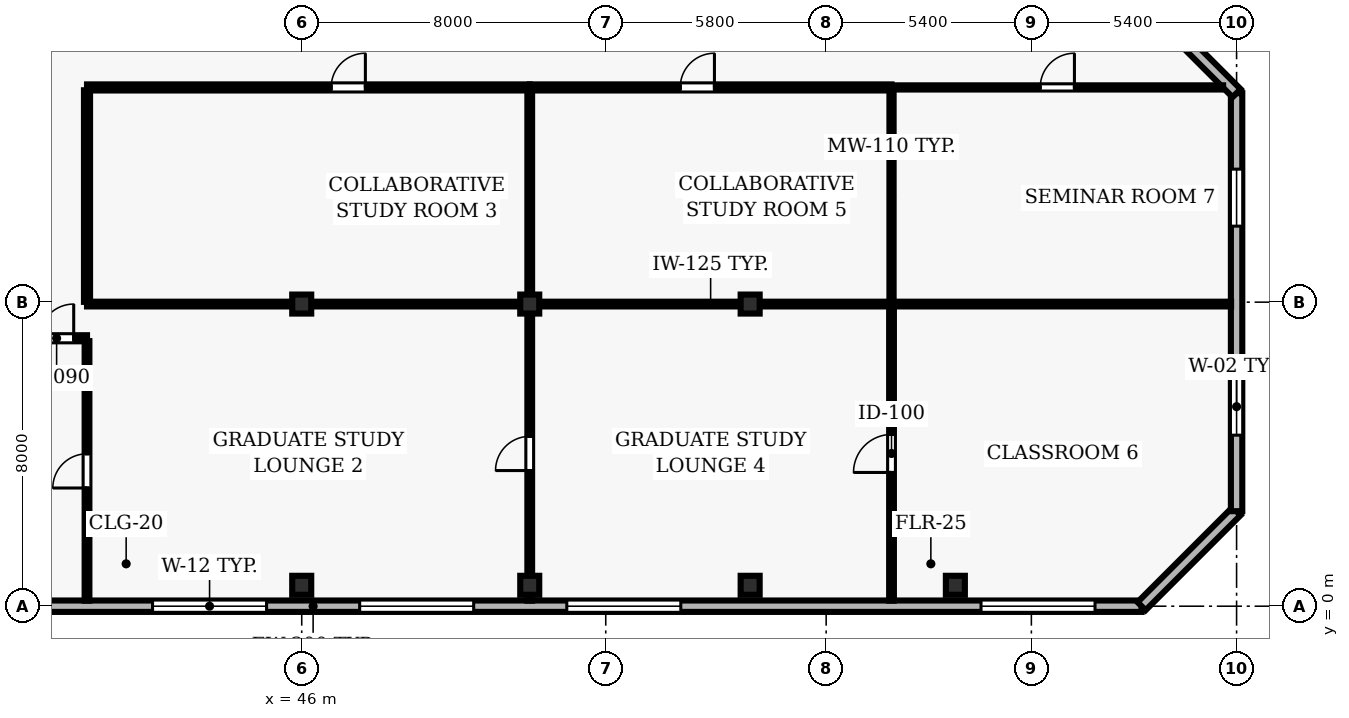
"""IFC4 building model, lengths in metres.
Left out: names, types, materials, properties, quantities, classifications, styles, units other than length and angle.
Written with IfcOpenShell. Run it as: python <this file> out.ifc"""

import sys

from ifc_helpers import new_model, si_unit, direction, frame, frame_2d, origin, origin_2d, place, context, subcontext, project, spatial, rectangle, hollow_rectangle, extrude, element, fill, save


model = new_model("IFC4")
c1 = context("Model", 3, precision=1e-05, world=origin(), true_north=direction((0.0, 1.0)))
c2 = subcontext(c1, "Body", "Model", "MODEL_VIEW")
j1 = project(units=[si_unit("LENGTHUNIT", "METRE"), si_unit("PLANEANGLEUNIT", "RADIAN")], contexts=[c1])
p1 = place(None, origin())
s1 = spatial("IfcSite", under=j1, at=p1, CompositionType="ELEMENT")
p2 = place(p1, origin())
s2 = spatial("IfcBuilding", under=s1, at=p2, CompositionType="ELEMENT")
p3 = place(p2, frame((0.0, 0.0, 146.3)))
s3 = spatial("IfcBuildingStorey", under=s2, at=p3, CompositionType="ELEMENT", Elevation=146.3)
for number, where, z_axis, x_axis in (
    (1, (46.0, 0.55, 0.0), (0.0, 0.0, 1.0), (1.0, 0.0, 0.0)),
    (2, (46.0, 7.95, 0.0), (0.0, 0.0, 1.0), (1.0, 0.0, 0.0)),
    (3, (52.0, 0.55, 0.0), (0.0, 0.0, 1.0), (1.0, 0.0, 0.0)),
    (4, (52.0, 7.95, 0.0), (0.0, 0.0, 1.0), (1.0, 0.0, 0.0)),
    (5, (57.8, 0.55, 0.0), (0.0, 0.0, 1.0), (1.0, 0.0, 0.0)),
    (6, (57.8, 7.95, 0.0), (0.0, 0.0, 1.0), (1.0, 0.0, 0.0)),
    (7, (63.2, 0.55, 0.0), (0.0, 0.0, 1.0), (1.0, 0.0, 0.0)),
):
    element("IfcColumn", number, at=place(p3, frame(where, z_axis=z_axis, x_axis=x_axis)), inside=s3, PredefinedType="COLUMN", context=c2, shape_type="SweptSolid", body=[
        extrude(hollow_rectangle(XDim=0.5, YDim=0.5, WallThickness=0.025, at=origin_2d()), origin(), (0.0, 0.0, 1.0), 3.9),
    ])
p4 = place(p3, frame((24.5, 0.0, 0.0), z_axis=(0.0, 0.0, 1.0), x_axis=(1.0, 0.0, 0.0)))
e8 = element("IfcWall", 8, at=p4, inside=s3, PredefinedType="SOLIDWALL", context=c2, shape_type="SweptSolid", body=[
    extrude(rectangle(XDim=43.6, YDim=0.3, at=frame_2d((21.8, 0.0))), origin(), (0.0, 0.0, 1.0), 3.69),
])
p5 = place(p4, frame((1.225, 0.0, 0.9)))
e9 = element("IfcOpeningElement", 9, at=p5, cuts=e8, PredefinedType="OPENING", context=c2, shape_type="SweptSolid", body=[
    extrude(rectangle(XDim=3.0, YDim=2.2, at=frame_2d((1.5, 1.1))), frame((0.0, 0.16, 0.0), z_axis=(0.0, -1.0, 0.0), x_axis=(1.0, 0.0, 0.0)), (0.0, 0.0, 1.0), 0.32),
])
p6 = place(p4, frame((17.575, 0.0, 0.9)))
e10 = element("IfcOpeningElement", 10, at=p6, cuts=e8, PredefinedType="OPENING", context=c2, shape_type="SweptSolid", body=[
    extrude(rectangle(XDim=3.0, YDim=2.2, at=frame_2d((1.5, 1.1))), frame((0.0, 0.16, 0.0), z_axis=(0.0, -1.0, 0.0), x_axis=(1.0, 0.0, 0.0)), (0.0, 0.0, 1.0), 0.32),
])
p7 = place(p4, frame((23.025, 0.0, 0.9)))
e11 = element("IfcOpeningElement", 11, at=p7, cuts=e8, PredefinedType="OPENING", context=c2, shape_type="SweptSolid", body=[
    extrude(rectangle(XDim=3.0, YDim=2.2, at=frame_2d((1.5, 1.1))), frame((0.0, 0.16, 0.0), z_axis=(0.0, -1.0, 0.0), x_axis=(1.0, 0.0, 0.0)), (0.0, 0.0, 1.0), 0.32),
])
p8 = place(p4, frame((28.475, 0.0, 0.9)))
e12 = element("IfcOpeningElement", 12, at=p8, cuts=e8, PredefinedType="OPENING", context=c2, shape_type="SweptSolid", body=[
    extrude(rectangle(XDim=3.0, YDim=2.2, at=frame_2d((1.5, 1.1))), frame((0.0, 0.16, 0.0), z_axis=(0.0, -1.0, 0.0), x_axis=(1.0, 0.0, 0.0)), (0.0, 0.0, 1.0), 0.32),
])
p9 = place(p4, frame((39.375, 0.0, 0.9)))
e13 = element("IfcOpeningElement", 13, at=p9, cuts=e8, PredefinedType="OPENING", context=c2, shape_type="SweptSolid", body=[
    extrude(rectangle(XDim=3.0, YDim=2.2, at=frame_2d((1.5, 1.1))), frame((0.0, 0.16, 0.0), z_axis=(0.0, -1.0, 0.0), x_axis=(1.0, 0.0, 0.0)), (0.0, 0.0, 1.0), 0.32),
])
p10 = place(p3, frame((68.1, 0.0, 0.0), z_axis=(0.0, 0.0, 1.0), x_axis=(0.707106781187, 0.707106781187, 0.0)))
e14 = element("IfcWall", 14, at=p10, inside=s3, PredefinedType="SOLIDWALL", context=c2, shape_type="SweptSolid", body=[
    extrude(rectangle(XDim=3.536, YDim=0.3, at=frame_2d((1.768, 0.0))), origin(), (0.0, 0.0, 1.0), 3.69),
])
p11 = place(p3, frame((70.6, 2.5, 0.0), z_axis=(0.0, 0.0, 1.0), x_axis=(0.0, 1.0, 0.0)))
e15 = element("IfcWall", 15, at=p11, inside=s3, PredefinedType="SOLIDWALL", context=c2, shape_type="SweptSolid", body=[
    extrude(rectangle(XDim=11.0, YDim=0.3, at=frame_2d((5.5, 0.0))), origin(), (0.0, 0.0, 1.0), 3.69),
])
p12 = place(p11, frame((2.0, 0.0, 0.9)))
e16 = element("IfcOpeningElement", 16, at=p12, cuts=e15, PredefinedType="OPENING", context=c2, shape_type="SweptSolid", body=[
    extrude(rectangle(XDim=1.5, YDim=1.6, at=frame_2d((0.75, 0.8))), frame((0.0, 0.16, 0.0), z_axis=(0.0, -1.0, 0.0), x_axis=(1.0, 0.0, 0.0)), (0.0, 0.0, 1.0), 0.32),
])
p13 = place(p11, frame((7.5, 0.0, 0.9)))
e17 = element("IfcOpeningElement", 17, at=p13, cuts=e15, PredefinedType="OPENING", context=c2, shape_type="SweptSolid", body=[
    extrude(rectangle(XDim=1.5, YDim=1.6, at=frame_2d((0.75, 0.8))), frame((0.0, 0.16, 0.0), z_axis=(0.0, -1.0, 0.0), x_axis=(1.0, 0.0, 0.0)), (0.0, 0.0, 1.0), 0.32),
])
p14 = place(p3, frame((70.6, 13.5, 0.0), z_axis=(0.0, 0.0, 1.0), x_axis=(-0.707106781187, 0.707106781187, 0.0)))
e18 = element("IfcWall", 18, at=p14, inside=s3, PredefinedType="SOLIDWALL", context=c2, shape_type="SweptSolid", body=[
    extrude(rectangle(XDim=3.536, YDim=0.3, at=frame_2d((1.768, 0.0))), origin(), (0.0, 0.0, 1.0), 3.69),
])
p15 = place(p3, frame((38.05, 7.05, 0.0), z_axis=(0.0, 0.0, 1.0), x_axis=(1.0, 0.0, 0.0)))
e19 = element("IfcWall", 19, at=p15, inside=s3, PredefinedType="PARTITIONING", context=c2, shape_type="SweptSolid", body=[
    extrude(rectangle(XDim=2.3, YDim=0.16, at=frame_2d((1.15, 0.0))), origin(), (0.0, 0.0, 1.0), 3.69),
])
p16 = place(p15, frame((1.05, 0.0, 0.0)))
e20 = element("IfcOpeningElement", 20, at=p16, cuts=e19, PredefinedType="OPENING", context=c2, shape_type="SweptSolid", body=[
    extrude(rectangle(XDim=0.9, YDim=2.1, at=frame_2d((0.45, 1.05))), frame((0.0, 0.09, 0.0), z_axis=(0.0, -1.0, 0.0), x_axis=(1.0, 0.0, 0.0)), (0.0, 0.0, 1.0), 0.18),
])
p17 = place(p3, frame((40.35, 13.65, 0.0), z_axis=(0.0, 0.0, 1.0), x_axis=(1.0, 0.0, 0.0)))
e21 = element("IfcWall", 21, at=p17, inside=s3, PredefinedType="PARTITIONING", context=c2, shape_type="SweptSolid", body=[
    extrude(rectangle(XDim=11.65, YDim=0.16, at=frame_2d((5.825, 0.0))), origin(), (0.0, 0.0, 1.0), 3.69),
])
p18 = place(p17, frame((6.425, 0.0, 0.0)))
e22 = element("IfcOpeningElement", 22, at=p18, cuts=e21, PredefinedType="OPENING", context=c2, shape_type="SweptSolid", body=[
    extrude(rectangle(XDim=0.9, YDim=2.1, at=frame_2d((0.45, 1.05))), frame((0.0, 0.09, 0.0), z_axis=(0.0, -1.0, 0.0), x_axis=(1.0, 0.0, 0.0)), (0.0, 0.0, 1.0), 0.18),
])
p19 = place(p3, frame((52.0, 7.95, 0.0), z_axis=(0.0, 0.0, 1.0), x_axis=(-1.0, 0.0, 0.0)))
e23 = element("IfcWall", 23, at=p19, inside=s3, PredefinedType="PARTITIONING", context=c2, shape_type="SweptSolid", body=[
    extrude(rectangle(XDim=11.65, YDim=0.125, at=frame_2d((5.825, 0.0))), origin(), (0.0, 0.0, 1.0), 3.073),
])
p20 = place(p3, frame((52.0, 13.65, 0.0), z_axis=(0.0, 0.0, 1.0), x_axis=(1.0, 0.0, 0.0)))
e24 = element("IfcWall", 24, at=p20, inside=s3, PredefinedType="PARTITIONING", context=c2, shape_type="SweptSolid", body=[
    extrude(rectangle(XDim=9.52, YDim=0.16, at=frame_2d((4.76, 0.0))), origin(), (0.0, 0.0, 1.0), 3.69),
])
p21 = place(p20, frame((3.96, 0.0, 0.0)))
e25 = element("IfcOpeningElement", 25, at=p21, cuts=e24, PredefinedType="OPENING", context=c2, shape_type="SweptSolid", body=[
    extrude(rectangle(XDim=0.9, YDim=2.1, at=frame_2d((0.45, 1.05))), frame((0.0, 0.09, 0.0), z_axis=(0.0, -1.0, 0.0), x_axis=(1.0, 0.0, 0.0)), (0.0, 0.0, 1.0), 0.18),
])
p22 = place(p3, frame((61.52, 7.95, 0.0), z_axis=(0.0, 0.0, 1.0), x_axis=(-1.0, 0.0, 0.0)))
e26 = element("IfcWall", 26, at=p22, inside=s3, PredefinedType="PARTITIONING", context=c2, shape_type="SweptSolid", body=[
    extrude(rectangle(XDim=9.52, YDim=0.125, at=frame_2d((4.76, 0.0))), origin(), (0.0, 0.0, 1.0), 3.073),
])
p23 = place(p3, frame((61.52, 13.65, 0.0), z_axis=(0.0, 0.0, 1.0), x_axis=(1.0, 0.0, 0.0)))
e27 = element("IfcWall", 27, at=p23, inside=s3, PredefinedType="MOVABLE", context=c2, shape_type="SweptSolid", body=[
    extrude(rectangle(XDim=8.725, YDim=0.11, at=frame_2d((4.363, 0.0))), origin(), (0.0, 0.0, 1.0), 3.69),
])
p24 = place(p23, frame((3.913, 0.0, 0.0)))
e28 = element("IfcOpeningElement", 28, at=p24, cuts=e27, PredefinedType="OPENING", context=c2, shape_type="SweptSolid", body=[
    extrude(rectangle(XDim=0.9, YDim=2.1, at=frame_2d((0.45, 1.05))), frame((0.0, 0.065, 0.0), z_axis=(0.0, -1.0, 0.0), x_axis=(1.0, 0.0, 0.0)), (0.0, 0.0, 1.0), 0.13),
])
p25 = place(p3, frame((70.455, 7.95, 0.0), z_axis=(0.0, 0.0, 1.0), x_axis=(-1.0, 0.0, 0.0)))
e29 = element("IfcWall", 29, at=p25, inside=s3, PredefinedType="PARTITIONING", context=c2, shape_type="SweptSolid", body=[
    extrude(rectangle(XDim=8.935, YDim=0.125, at=frame_2d((4.468, 0.0))), origin(), (0.0, 0.0, 1.0), 3.69),
])
p26 = place(p3, frame((40.35, 0.145, 0.0), z_axis=(0.0, 0.0, 1.0), x_axis=(0.0, 1.0, 0.0)))
e30 = element("IfcWall", 30, at=p26, inside=s3, PredefinedType="PARTITIONING", context=c2, shape_type="SweptSolid", body=[
    extrude(rectangle(XDim=6.83, YDim=0.125, at=frame_2d((3.415, 0.0))), origin(), (0.0, 0.0, 1.0), 3.69),
])
p27 = place(p26, frame((2.965, 0.0, 0.0)))
e31 = element("IfcOpeningElement", 31, at=p27, cuts=e30, PredefinedType="OPENING", context=c2, shape_type="SweptSolid", body=[
    extrude(rectangle(XDim=0.9, YDim=2.1, at=frame_2d((0.45, 1.05))), frame((0.0, 0.073, 0.0), z_axis=(0.0, -1.0, 0.0), x_axis=(1.0, 0.0, 0.0)), (0.0, 0.0, 1.0), 0.145),
])
p28 = place(p3, frame((40.35, 8.008, 0.0), z_axis=(0.0, 0.0, 1.0), x_axis=(0.0, 1.0, 0.0)))
e32 = element("IfcWall", 32, at=p28, inside=s3, PredefinedType="PARTITIONING", context=c2, shape_type="SweptSolid", body=[
    extrude(rectangle(XDim=5.567, YDim=0.16, at=frame_2d((2.783, 0.0))), origin(), (0.0, 0.0, 1.0), 3.69),
])
p29 = place(p3, frame((52.0, 0.145, 0.0), z_axis=(0.0, 0.0, 1.0), x_axis=(0.0, 1.0, 0.0)))
e33 = element("IfcWall", 33, at=p29, inside=s3, PredefinedType="PARTITIONING", context=c2, shape_type="SweptSolid", body=[
    extrude(rectangle(XDim=7.748, YDim=0.125, at=frame_2d((3.874, 0.0))), origin(), (0.0, 0.0, 1.0), 3.073),
])
p30 = place(p29, frame((3.424, 0.0, 0.0)))
e34 = element("IfcOpeningElement", 34, at=p30, cuts=e33, PredefinedType="OPENING", context=c2, shape_type="SweptSolid", body=[
    extrude(rectangle(XDim=0.9, YDim=2.1, at=frame_2d((0.45, 1.05))), frame((0.0, 0.073, 0.0), z_axis=(0.0, -1.0, 0.0), x_axis=(1.0, 0.0, 0.0)), (0.0, 0.0, 1.0), 0.145),
])
p31 = place(p3, frame((52.0, 8.008, 0.0), z_axis=(0.0, 0.0, 1.0), x_axis=(0.0, 1.0, 0.0)))
e35 = element("IfcWall", 35, at=p31, inside=s3, PredefinedType="PARTITIONING", context=c2, shape_type="SweptSolid", body=[
    extrude(rectangle(XDim=5.567, YDim=0.125, at=frame_2d((2.783, 0.0))), origin(), (0.0, 0.0, 1.0), 3.073),
])
p32 = place(p3, frame((61.52, 0.145, 0.0), z_axis=(0.0, 0.0, 1.0), x_axis=(0.0, 1.0, 0.0)))
e36 = element("IfcWall", 36, at=p32, inside=s3, PredefinedType="PARTITIONING", context=c2, shape_type="SweptSolid", body=[
    extrude(rectangle(XDim=7.748, YDim=0.125, at=frame_2d((3.874, 0.0))), origin(), (0.0, 0.0, 1.0), 3.69),
])
p33 = place(p32, frame((3.374, 0.0, 0.0)))
e37 = element("IfcOpeningElement", 37, at=p33, cuts=e36, PredefinedType="OPENING", context=c2, shape_type="SweptSolid", body=[
    extrude(rectangle(XDim=1.0, YDim=2.1, at=frame_2d((0.5, 1.05))), frame((0.0, 0.073, 0.0), z_axis=(0.0, -1.0, 0.0), x_axis=(1.0, 0.0, 0.0)), (0.0, 0.0, 1.0), 0.145),
])
p34 = place(p3, frame((61.52, 8.008, 0.0), z_axis=(0.0, 0.0, 1.0), x_axis=(0.0, 1.0, 0.0)))
e38 = element("IfcWall", 38, at=p34, inside=s3, PredefinedType="MOVABLE", context=c2, shape_type="SweptSolid", body=[
    extrude(rectangle(XDim=5.567, YDim=0.11, at=frame_2d((2.783, 0.0))), origin(), (0.0, 0.0, 1.0), 3.69),
])
p35 = place(p6, origin())
e39 = element("IfcWindow", 39, at=p35, inside=s3, PartitioningType="SINGLE_PANEL", PredefinedType="WINDOW", context=c2, shape_type="SweptSolid", body=[
    extrude(rectangle(XDim=3.0, YDim=2.2, at=frame_2d((1.5, 1.1))), frame((0.0, 0.03, 0.0), z_axis=(0.0, -1.0, 0.0), x_axis=(1.0, 0.0, 0.0)), (0.0, 0.0, 1.0), 0.06),
])
fill(e10, e39)
p36 = place(p7, origin())
e40 = element("IfcWindow", 40, at=p36, inside=s3, PartitioningType="SINGLE_PANEL", PredefinedType="WINDOW", context=c2, shape_type="SweptSolid", body=[
    extrude(rectangle(XDim=3.0, YDim=2.2, at=frame_2d((1.5, 1.1))), frame((0.0, 0.03, 0.0), z_axis=(0.0, -1.0, 0.0), x_axis=(1.0, 0.0, 0.0)), (0.0, 0.0, 1.0), 0.06),
])
fill(e11, e40)
p37 = place(p8, origin())
e41 = element("IfcWindow", 41, at=p37, inside=s3, PartitioningType="SINGLE_PANEL", PredefinedType="WINDOW", context=c2, shape_type="SweptSolid", body=[
    extrude(rectangle(XDim=3.0, YDim=2.2, at=frame_2d((1.5, 1.1))), frame((0.0, 0.03, 0.0), z_axis=(0.0, -1.0, 0.0), x_axis=(1.0, 0.0, 0.0)), (0.0, 0.0, 1.0), 0.06),
])
fill(e12, e41)
p38 = place(p9, origin())
e42 = element("IfcWindow", 42, at=p38, inside=s3, PartitioningType="SINGLE_PANEL", PredefinedType="WINDOW", context=c2, shape_type="SweptSolid", body=[
    extrude(rectangle(XDim=3.0, YDim=2.2, at=frame_2d((1.5, 1.1))), frame((0.0, 0.03, 0.0), z_axis=(0.0, -1.0, 0.0), x_axis=(1.0, 0.0, 0.0)), (0.0, 0.0, 1.0), 0.06),
])
fill(e13, e42)
p39 = place(p12, origin())
e43 = element("IfcWindow", 43, at=p39, inside=s3, PartitioningType="SINGLE_PANEL", PredefinedType="WINDOW", context=c2, shape_type="SweptSolid", body=[
    extrude(rectangle(XDim=1.5, YDim=1.6, at=frame_2d((0.75, 0.8))), frame((0.0, 0.03, 0.0), z_axis=(0.0, -1.0, 0.0), x_axis=(1.0, 0.0, 0.0)), (0.0, 0.0, 1.0), 0.06),
])
fill(e16, e43)
p40 = place(p13, origin())
e44 = element("IfcWindow", 44, at=p40, inside=s3, PartitioningType="SINGLE_PANEL", PredefinedType="WINDOW", context=c2, shape_type="SweptSolid", body=[
    extrude(rectangle(XDim=1.5, YDim=1.6, at=frame_2d((0.75, 0.8))), frame((0.0, 0.03, 0.0), z_axis=(0.0, -1.0, 0.0), x_axis=(1.0, 0.0, 0.0)), (0.0, 0.0, 1.0), 0.06),
])
fill(e17, e44)
p41 = place(p16, origin())
e45 = element("IfcDoor", 45, at=p41, inside=s3, OperationType="SINGLE_SWING_RIGHT", PredefinedType="DOOR", context=c2, shape_type="SweptSolid", body=[
    extrude(rectangle(XDim=0.9, YDim=2.1, at=frame_2d((0.45, 1.05))), frame((0.0, 0.025, 0.0), z_axis=(0.0, -1.0, 0.0), x_axis=(1.0, 0.0, 0.0)), (0.0, 0.0, 1.0), 0.05),
])
fill(e20, e45)
p42 = place(p27, origin())
e46 = element("IfcDoor", 46, at=p42, inside=s3, OperationType="SINGLE_SWING_LEFT", PredefinedType="DOOR", context=c2, shape_type="SweptSolid", body=[
    extrude(rectangle(XDim=0.9, YDim=2.1, at=frame_2d((0.45, 1.05))), frame((0.0, 0.025, 0.0), z_axis=(0.0, -1.0, 0.0), x_axis=(1.0, 0.0, 0.0)), (0.0, 0.0, 1.0), 0.05),
])
fill(e31, e46)
p43 = place(p18, origin())
e47 = element("IfcDoor", 47, at=p43, inside=s3, OperationType="SINGLE_SWING_RIGHT", PredefinedType="DOOR", context=c2, shape_type="SweptSolid", body=[
    extrude(rectangle(XDim=0.9, YDim=2.1, at=frame_2d((0.45, 1.05))), frame((0.0, 0.025, 0.0), z_axis=(0.0, -1.0, 0.0), x_axis=(1.0, 0.0, 0.0)), (0.0, 0.0, 1.0), 0.05),
])
fill(e22, e47)
p44 = place(p30, origin())
e48 = element("IfcDoor", 48, at=p44, inside=s3, OperationType="SINGLE_SWING_LEFT", PredefinedType="DOOR", context=c2, shape_type="SweptSolid", body=[
    extrude(rectangle(XDim=0.9, YDim=2.1, at=frame_2d((0.45, 1.05))), frame((0.0, 0.025, 0.0), z_axis=(0.0, -1.0, 0.0), x_axis=(1.0, 0.0, 0.0)), (0.0, 0.0, 1.0), 0.05),
])
fill(e34, e48)
p45 = place(p21, origin())
e49 = element("IfcDoor", 49, at=p45, inside=s3, OperationType="SINGLE_SWING_RIGHT", PredefinedType="DOOR", context=c2, shape_type="SweptSolid", body=[
    extrude(rectangle(XDim=0.9, YDim=2.1, at=frame_2d((0.45, 1.05))), frame((0.0, 0.025, 0.0), z_axis=(0.0, -1.0, 0.0), x_axis=(1.0, 0.0, 0.0)), (0.0, 0.0, 1.0), 0.05),
])
fill(e25, e49)
p46 = place(p33, origin())
e50 = element("IfcDoor", 50, at=p46, inside=s3, OperationType="SINGLE_SWING_LEFT", PredefinedType="DOOR", context=c2, shape_type="SweptSolid", body=[
    extrude(rectangle(XDim=1.0, YDim=2.1, at=frame_2d((0.5, 1.05))), frame((0.0, 0.025, 0.0), z_axis=(0.0, -1.0, 0.0), x_axis=(1.0, 0.0, 0.0)), (0.0, 0.0, 1.0), 0.05),
])
fill(e37, e50)
p47 = place(p24, origin())
e51 = element("IfcDoor", 51, at=p47, inside=s3, OperationType="SINGLE_SWING_RIGHT", PredefinedType="DOOR", context=c2, shape_type="SweptSolid", body=[
    extrude(rectangle(XDim=0.9, YDim=2.1, at=frame_2d((0.45, 1.05))), frame((0.0, 0.025, 0.0), z_axis=(0.0, -1.0, 0.0), x_axis=(1.0, 0.0, 0.0)), (0.0, 0.0, 1.0), 0.05),
])
fill(e28, e51)
save(model, sys.argv[1])
